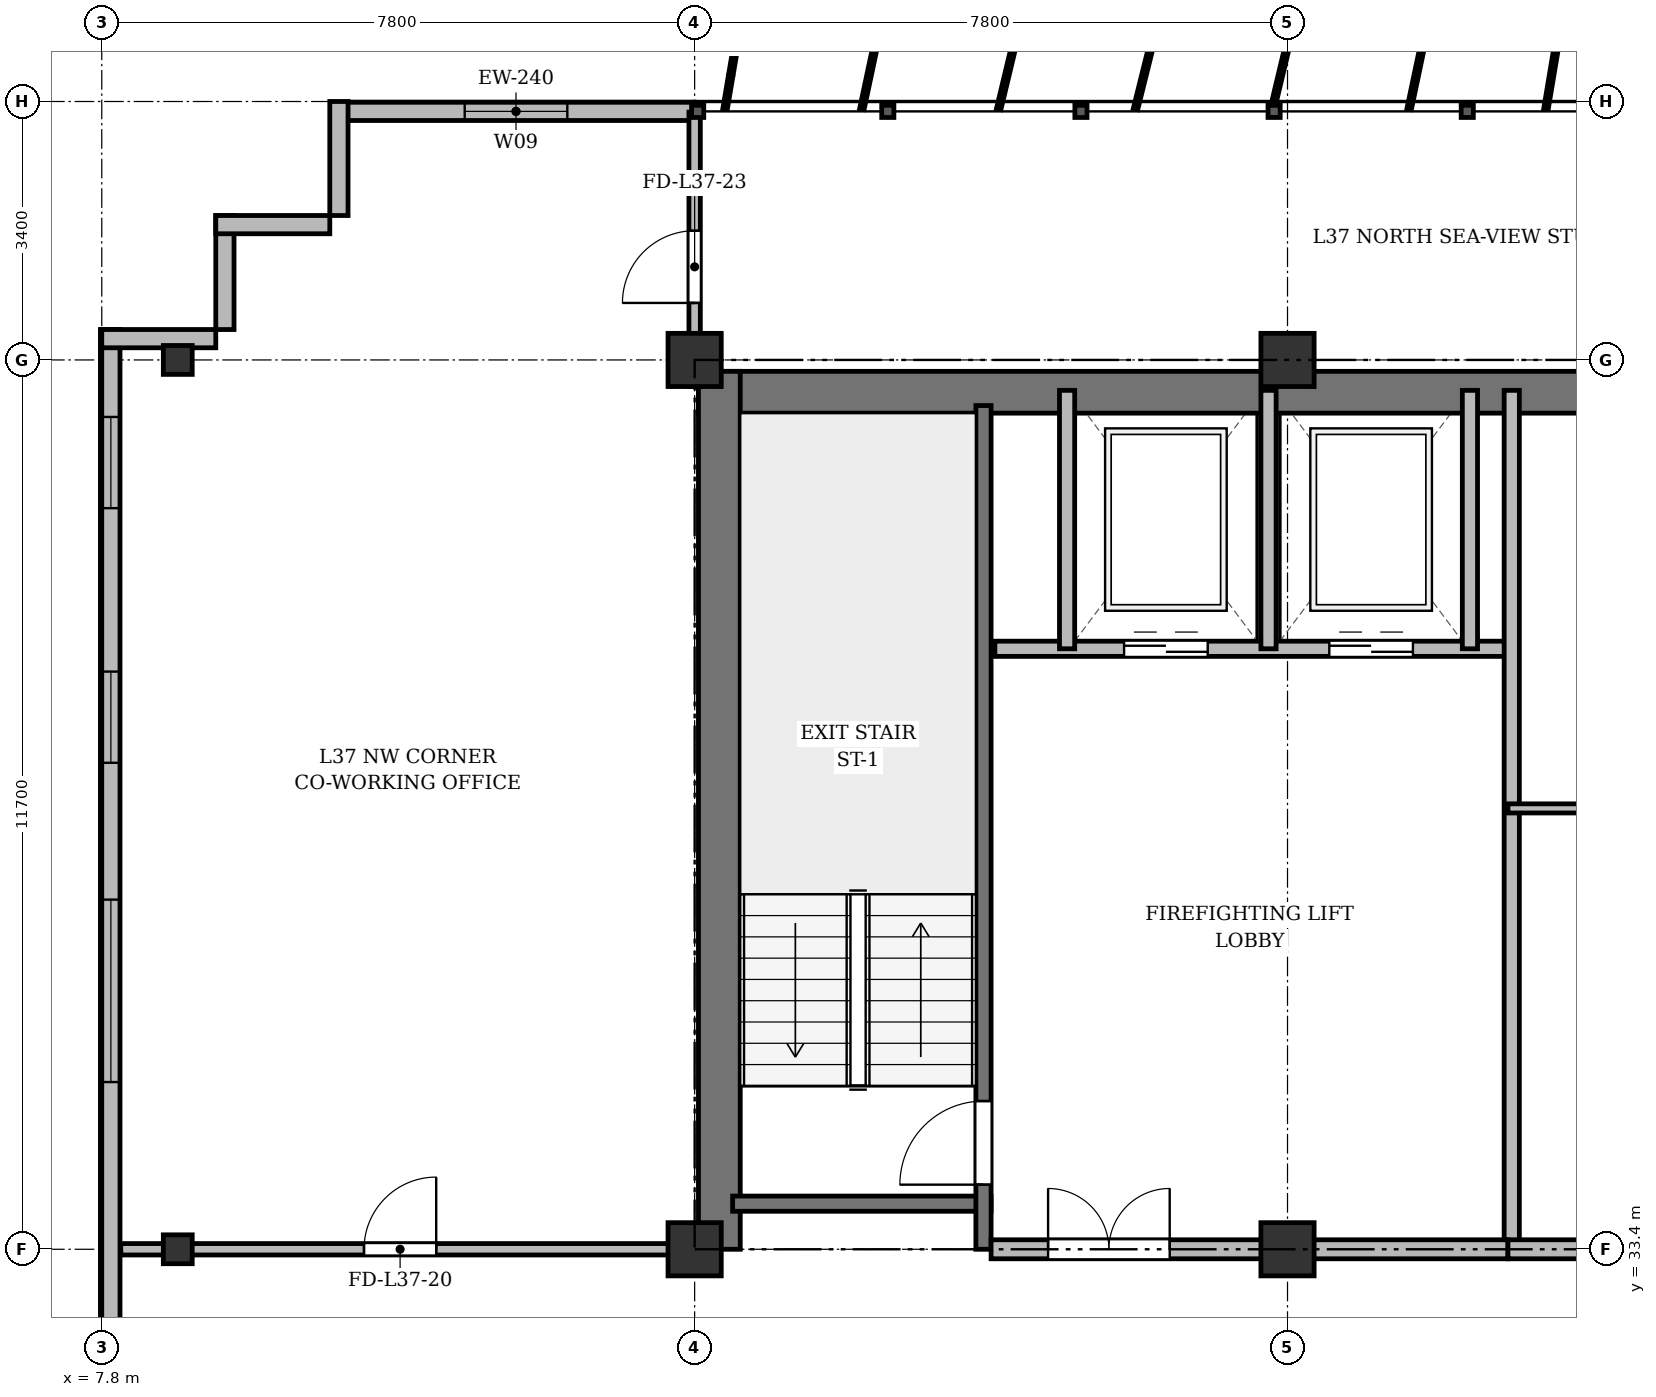
"""IFC4 building model, lengths in metres.
Left out: names, types, materials, properties, quantities, classifications, styles, units other than length and angle.
Written with IfcOpenShell. Run it as: python <this file> out.ifc"""

import sys

from ifc_helpers import new_model, si_unit, direction, frame, frame_2d, origin, origin_2d, place, context, subcontext, project, spatial, rectangle, i_section, extrude, source, transform, mapped, element, fill, save


model = new_model("IFC4")
c1 = context("Model", 3, precision=1e-05, world=origin(), true_north=direction((0.0, 1.0)))
c2 = subcontext(c1, "Body", "Model", "MODEL_VIEW")
j1 = project(units=[si_unit("LENGTHUNIT", "METRE"), si_unit("PLANEANGLEUNIT", "RADIAN")], contexts=[c1])
p1 = place(None, origin())
s1 = spatial("IfcSite", under=j1, at=p1, CompositionType="ELEMENT")
p2 = place(p1, origin())
s2 = spatial("IfcBuilding", under=s1, at=p2, CompositionType="ELEMENT")
p3 = place(p2, frame((0.0, 0.0, 142.9)))
s3 = spatial("IfcBuildingStorey", under=s2, at=p3, CompositionType="ELEMENT", Elevation=142.9)
m1 = source(origin(), c2, "Body", "SweptSolid", [
    extrude(i_section(OverallWidth=0.38, OverallDepth=0.38, WebThickness=0.02, FlangeThickness=0.03, at=origin_2d()), origin(), (0.0, 0.0, 1.0), 3.6),
])
for number, where, z_axis, x_axis in (
    (1, (8.8, 33.4, 0.0), (0.0, 0.0, 1.0), (1.0, 0.0, 0.0)),
    (2, (8.8, 45.1, 0.0), (0.0, 0.0, 1.0), (1.0, 0.0, 0.0)),
):
    element("IfcColumn", number, at=place(p3, frame(where, z_axis=z_axis, x_axis=x_axis)), inside=s3, PredefinedType="COLUMN", context=c2, shape_type="MappedRepresentation", body=[
        mapped(m1, transform((0.0, 0.0, 0.0), x_axis=(1.0, 0.0, 0.0), y_axis=(0.0, 1.0, 0.0), z_axis=(0.0, 0.0, 1.0), scale=1.0)),
    ])
m2 = source(origin(), c2, "Body", "SweptSolid", [
    extrude(rectangle(XDim=0.7, YDim=0.7, at=origin_2d()), origin(), (0.0, 0.0, 1.0), 3.6),
])
for number, where, z_axis, x_axis in (
    (3, (15.6, 33.4, 0.0), (0.0, 0.0, 1.0), (1.0, 0.0, 0.0)),
    (4, (15.6, 45.1, 0.0), (0.0, 0.0, 1.0), (1.0, 0.0, 0.0)),
    (5, (23.4, 33.4, 0.0), (0.0, 0.0, 1.0), (1.0, 0.0, 0.0)),
    (6, (23.4, 45.1, 0.0), (0.0, 0.0, 1.0), (1.0, 0.0, 0.0)),
):
    element("IfcColumn", number, at=place(p3, frame(where, z_axis=z_axis, x_axis=x_axis)), inside=s3, PredefinedType="COLUMN", context=c2, shape_type="MappedRepresentation", body=[
        mapped(m2, transform((0.0, 0.0, 0.0), x_axis=(1.0, 0.0, 0.0), y_axis=(0.0, 1.0, 0.0), z_axis=(0.0, 0.0, 1.0), scale=1.0)),
    ])
p4 = place(p3, frame((10.9, 48.37, 0.0), z_axis=(0.0, 0.0, 1.0), x_axis=(1.0, 0.0, 0.0)))
e7 = element("IfcWall", 7, at=p4, inside=s3, PredefinedType="SOLIDWALL", context=c2, shape_type="SweptSolid", body=[
    extrude(rectangle(XDim=4.7, YDim=0.24, at=frame_2d((2.35, 0.0))), origin(), (0.0, 0.0, 1.0), 3.35),
])
p5 = place(p4, frame((1.675, 0.0, 0.9)))
e8 = element("IfcOpeningElement", 8, at=p5, cuts=e7, PredefinedType="OPENING", context=c2, shape_type="SweptSolid", body=[
    extrude(rectangle(XDim=1.35, YDim=1.5, at=frame_2d((0.675, 0.75))), frame((0.0, 0.13, 0.0), z_axis=(0.0, -1.0, 0.0), x_axis=(1.0, 0.0, 0.0)), (0.0, 0.0, 1.0), 0.26),
])
p6 = place(p3, frame((7.92, 6.3, 0.0), z_axis=(0.0, 0.0, 1.0), x_axis=(0.0, 1.0, 0.0)))
e9 = element("IfcWall", 9, at=p6, inside=s3, PredefinedType="SOLIDWALL", context=c2, shape_type="SweptSolid", body=[
    extrude(rectangle(XDim=39.2, YDim=0.24, at=frame_2d((19.6, 0.0))), origin(), (0.0, 0.0, 1.0), 3.35),
])
p7 = place(p6, frame((1.45, 0.0, 0.92)))
e10 = element("IfcOpeningElement", 10, at=p7, cuts=e9, PredefinedType="OPENING", context=c2, shape_type="SweptSolid", body=[
    extrude(rectangle(XDim=1.2, YDim=1.65, at=frame_2d((0.6, 0.825))), frame((0.0, 0.13, 0.0), z_axis=(0.0, -1.0, 0.0), x_axis=(1.0, 0.0, 0.0)), (0.0, 0.0, 1.0), 0.26),
])
p8 = place(p6, frame((3.9, 0.0, 0.92)))
e11 = element("IfcOpeningElement", 11, at=p8, cuts=e9, PredefinedType="OPENING", context=c2, shape_type="SweptSolid", body=[
    extrude(rectangle(XDim=2.4, YDim=2.1, at=frame_2d((1.2, 1.05))), frame((0.0, 0.13, 0.0), z_axis=(0.0, -1.0, 0.0), x_axis=(1.0, 0.0, 0.0)), (0.0, 0.0, 1.0), 0.26),
])
p9 = place(p6, frame((8.1, 0.0, 0.92)))
e12 = element("IfcOpeningElement", 12, at=p9, cuts=e9, PredefinedType="OPENING", context=c2, shape_type="SweptSolid", body=[
    extrude(rectangle(XDim=2.4, YDim=2.1, at=frame_2d((1.2, 1.05))), frame((0.0, 0.13, 0.0), z_axis=(0.0, -1.0, 0.0), x_axis=(1.0, 0.0, 0.0)), (0.0, 0.0, 1.0), 0.26),
])
p10 = place(p6, frame((15.3, 0.0, 0.92)))
e13 = element("IfcOpeningElement", 13, at=p10, cuts=e9, PredefinedType="OPENING", context=c2, shape_type="SweptSolid", body=[
    extrude(rectangle(XDim=2.4, YDim=2.1, at=frame_2d((1.2, 1.05))), frame((0.0, 0.13, 0.0), z_axis=(0.0, -1.0, 0.0), x_axis=(1.0, 0.0, 0.0)), (0.0, 0.0, 1.0), 0.26),
])
p11 = place(p6, frame((29.3, 0.0, 0.92)))
e14 = element("IfcOpeningElement", 14, at=p11, cuts=e9, PredefinedType="OPENING", context=c2, shape_type="SweptSolid", body=[
    extrude(rectangle(XDim=2.4, YDim=2.1, at=frame_2d((1.2, 1.05))), frame((0.0, 0.13, 0.0), z_axis=(0.0, -1.0, 0.0), x_axis=(1.0, 0.0, 0.0)), (0.0, 0.0, 1.0), 0.26),
])
p12 = place(p6, frame((33.5, 0.0, 0.92)))
e15 = element("IfcOpeningElement", 15, at=p12, cuts=e9, PredefinedType="OPENING", context=c2, shape_type="SweptSolid", body=[
    extrude(rectangle(XDim=1.2, YDim=1.65, at=frame_2d((0.6, 0.825))), frame((0.0, 0.13, 0.0), z_axis=(0.0, -1.0, 0.0), x_axis=(1.0, 0.0, 0.0)), (0.0, 0.0, 1.0), 0.26),
])
p13 = place(p6, frame((36.85, 0.0, 0.92)))
e16 = element("IfcOpeningElement", 16, at=p13, cuts=e9, PredefinedType="OPENING", context=c2, shape_type="SweptSolid", body=[
    extrude(rectangle(XDim=1.2, YDim=1.65, at=frame_2d((0.6, 0.825))), frame((0.0, 0.13, 0.0), z_axis=(0.0, -1.0, 0.0), x_axis=(1.0, 0.0, 0.0)), (0.0, 0.0, 1.0), 0.26),
])
for number, where, z_axis, x_axis in (
    (17, (7.8, 45.38, 0.0), (0.0, 0.0, 1.0), (1.0, 0.0, 0.0)),
    (18, (9.42, 45.5, 0.0), (0.0, 0.0, 1.0), (0.0, 1.0, 0.0)),
    (19, (9.3, 46.88, 0.0), (0.0, 0.0, 1.0), (1.0, 0.0, 0.0)),
    (20, (10.92, 47.0, 0.0), (0.0, 0.0, 1.0), (0.0, 1.0, 0.0)),
):
    element("IfcWall", number, at=place(p3, frame(where, z_axis=z_axis, x_axis=x_axis)), inside=s3, PredefinedType="SOLIDWALL", context=c2, shape_type="SweptSolid", body=[
        extrude(rectangle(XDim=1.5, YDim=0.24, at=frame_2d((0.75, 0.0))), origin(), (0.0, 0.0, 1.0), 3.35),
    ])
p14 = place(p3, frame((15.65, 44.675, 0.0), z_axis=(0.0, 0.0, 1.0), x_axis=(1.0, 0.0, 0.0)))
e21 = element("IfcWall", 21, at=p14, inside=s3, PredefinedType="SHEAR", context=c2, shape_type="SweptSolid", body=[
    extrude(rectangle(XDim=43.1, YDim=0.55, at=frame_2d((21.55, 0.0))), origin(), (0.0, 0.0, 1.0), 3.35),
])
p15 = place(p3, frame((15.925, 33.4, 0.0), z_axis=(0.0, 0.0, 1.0), x_axis=(0.0, 1.0, 0.0)))
e22 = element("IfcWall", 22, at=p15, inside=s3, PredefinedType="SHEAR", context=c2, shape_type="SweptSolid", body=[
    extrude(rectangle(XDim=11.55, YDim=0.55, at=frame_2d((5.775, 0.0))), origin(), (0.0, 0.0, 1.0), 3.35),
])
p16 = place(p3, frame((16.1, 34.0, 0.0), z_axis=(0.0, 0.0, 1.0), x_axis=(1.0, 0.0, 0.0)))
e23 = element("IfcWall", 23, at=p16, inside=s3, PredefinedType="SHEAR", context=c2, shape_type="SweptSolid", body=[
    extrude(rectangle(XDim=3.4, YDim=0.2, at=frame_2d((1.7, 0.0))), origin(), (0.0, 0.0, 1.0), 3.35),
])
p17 = place(p3, frame((19.4, 33.4, 0.0), z_axis=(0.0, 0.0, 1.0), x_axis=(0.0, 1.0, 0.0)))
e24 = element("IfcWall", 24, at=p17, inside=s3, PredefinedType="SHEAR", context=c2, shape_type="SweptSolid", body=[
    extrude(rectangle(XDim=11.1, YDim=0.2, at=frame_2d((5.55, 0.0))), origin(), (0.0, 0.0, 1.0), 3.35),
])
p18 = place(p17, frame((0.85, 0.0, 0.0)))
e25 = element("IfcOpeningElement", 25, at=p18, cuts=e24, PredefinedType="OPENING", context=c2, shape_type="SweptSolid", body=[
    extrude(rectangle(XDim=1.1, YDim=2.15, at=frame_2d((0.55, 1.075))), frame((0.0, 0.11, 0.0), z_axis=(0.0, -1.0, 0.0), x_axis=(1.0, 0.0, 0.0)), (0.0, 0.0, 1.0), 0.22),
])
p19 = place(p3, frame((19.55, 41.3, 0.0), z_axis=(0.0, 0.0, 1.0), x_axis=(1.0, 0.0, 0.0)))
e26 = element("IfcWall", 26, at=p19, inside=s3, PredefinedType="SOLIDWALL", context=c2, shape_type="SweptSolid", body=[
    extrude(rectangle(XDim=6.75, YDim=0.2, at=frame_2d((3.375, 0.0))), origin(), (0.0, 0.0, 1.0), 3.35),
])
p20 = place(p19, frame((1.7, 0.0, 0.0)))
e27 = element("IfcOpeningElement", 27, at=p20, cuts=e26, PredefinedType="OPENING", context=c2, shape_type="SweptSolid", body=[
    extrude(rectangle(XDim=1.1, YDim=2.15, at=frame_2d((0.55, 1.075))), frame((0.0, 0.11, 0.0), z_axis=(0.0, -1.0, 0.0), x_axis=(1.0, 0.0, 0.0)), (0.0, 0.0, 1.0), 0.22),
])
p21 = place(p19, frame((4.4, 0.0, 0.0)))
e28 = element("IfcOpeningElement", 28, at=p21, cuts=e26, PredefinedType="OPENING", context=c2, shape_type="SweptSolid", body=[
    extrude(rectangle(XDim=1.1, YDim=2.15, at=frame_2d((0.55, 1.075))), frame((0.0, 0.11, 0.0), z_axis=(0.0, -1.0, 0.0), x_axis=(1.0, 0.0, 0.0)), (0.0, 0.0, 1.0), 0.22),
])
for number, where, z_axis, x_axis in (
    (29, (20.5, 41.3, 0.0), (0.0, 0.0, 1.0), (0.0, 1.0, 0.0)),
    (30, (23.15, 41.3, 0.0), (0.0, 0.0, 1.0), (0.0, 1.0, 0.0)),
    (31, (25.8, 41.3, 0.0), (0.0, 0.0, 1.0), (0.0, 1.0, 0.0)),
):
    element("IfcWall", number, at=place(p3, frame(where, z_axis=z_axis, x_axis=x_axis)), inside=s3, PredefinedType="SOLIDWALL", context=c2, shape_type="SweptSolid", body=[
        extrude(rectangle(XDim=3.4, YDim=0.2, at=frame_2d((1.7, 0.0))), origin(), (0.0, 0.0, 1.0), 3.35),
    ])
p22 = place(p3, frame((26.35, 33.4, 0.0), z_axis=(0.0, 0.0, 1.0), x_axis=(0.0, 1.0, 0.0)))
e32 = element("IfcWall", 32, at=p22, inside=s3, PredefinedType="SOLIDWALL", context=c2, shape_type="SweptSolid", body=[
    extrude(rectangle(XDim=11.3, YDim=0.2, at=frame_2d((5.65, 0.0))), origin(), (0.0, 0.0, 1.0), 2.75),
])
p23 = place(p3, frame((19.5, 33.4, 0.0), z_axis=(0.0, 0.0, 1.0), x_axis=(1.0, 0.0, 0.0)))
e33 = element("IfcWall", 33, at=p23, inside=s3, PredefinedType="PARTITIONING", context=c2, shape_type="SweptSolid", body=[
    extrude(rectangle(XDim=6.8, YDim=0.25, at=frame_2d((3.4, 0.0))), origin(), (0.0, 0.0, 1.0), 2.75),
])
p24 = place(p23, frame((0.75, 0.0, 0.0)))
e34 = element("IfcOpeningElement", 34, at=p24, cuts=e33, PredefinedType="OPENING", context=c2, shape_type="SweptSolid", body=[
    extrude(rectangle(XDim=1.6, YDim=2.2, at=frame_2d((0.8, 1.1))), frame((0.0, 0.135, 0.0), z_axis=(0.0, -1.0, 0.0), x_axis=(1.0, 0.0, 0.0)), (0.0, 0.0, 1.0), 0.27),
])
p25 = place(p3, frame((26.3, 39.2, 0.0), z_axis=(0.0, 0.0, 1.0), x_axis=(1.0, 0.0, 0.0)))
e35 = element("IfcWall", 35, at=p25, inside=s3, PredefinedType="PARTITIONING", context=c2, shape_type="SweptSolid", body=[
    extrude(rectangle(XDim=7.0, YDim=0.12, at=frame_2d((3.5, 0.0))), origin(), (0.0, 0.0, 1.0), 2.85),
])
p26 = place(p25, frame((2.6, 0.0, 0.0)))
e36 = element("IfcOpeningElement", 36, at=p26, cuts=e35, PredefinedType="OPENING", context=c2, shape_type="SweptSolid", body=[
    extrude(rectangle(XDim=0.95, YDim=2.15, at=frame_2d((0.475, 1.075))), frame((0.0, 0.07, 0.0), z_axis=(0.0, -1.0, 0.0), x_axis=(1.0, 0.0, 0.0)), (0.0, 0.0, 1.0), 0.14),
])
p27 = place(p3, frame((26.3, 33.4, 0.0), z_axis=(0.0, 0.0, 1.0), x_axis=(1.0, 0.0, 0.0)))
e37 = element("IfcWall", 37, at=p27, inside=s3, PredefinedType="PARTITIONING", context=c2, shape_type="SweptSolid", body=[
    extrude(rectangle(XDim=7.0, YDim=0.25, at=frame_2d((3.5, 0.0))), origin(), (0.0, 0.0, 1.0), 2.75),
])
p28 = place(p27, frame((1.35, 0.0, 0.0)))
e38 = element("IfcOpeningElement", 38, at=p28, cuts=e37, PredefinedType="OPENING", context=c2, shape_type="SweptSolid", body=[
    extrude(rectangle(XDim=0.95, YDim=2.15, at=frame_2d((0.475, 1.075))), frame((0.0, 0.135, 0.0), z_axis=(0.0, -1.0, 0.0), x_axis=(1.0, 0.0, 0.0)), (0.0, 0.0, 1.0), 0.27),
])
p29 = place(p3, frame((8.05, 33.4, 0.0), z_axis=(0.0, 0.0, 1.0), x_axis=(1.0, 0.0, 0.0)))
e39 = element("IfcWall", 39, at=p29, inside=s3, PredefinedType="PARTITIONING", context=c2, shape_type="SweptSolid", body=[
    extrude(rectangle(XDim=7.55, YDim=0.15, at=frame_2d((3.775, 0.0))), origin(), (0.0, 0.0, 1.0), 2.75),
])
p30 = place(p29, frame((3.2, 0.0, 0.0)))
e40 = element("IfcOpeningElement", 40, at=p30, cuts=e39, PredefinedType="OPENING", context=c2, shape_type="SweptSolid", body=[
    extrude(rectangle(XDim=0.95, YDim=2.15, at=frame_2d((0.475, 1.075))), frame((0.0, 0.085, 0.0), z_axis=(0.0, -1.0, 0.0), x_axis=(1.0, 0.0, 0.0)), (0.0, 0.0, 1.0), 0.17),
])
p31 = place(p3, frame((15.6, 44.75, 0.0), z_axis=(0.0, 0.0, 1.0), x_axis=(0.0, 1.0, 0.0)))
e41 = element("IfcWall", 41, at=p31, inside=s3, PredefinedType="PARTITIONING", context=c2, shape_type="SweptSolid", body=[
    extrude(rectangle(XDim=3.61, YDim=0.15, at=frame_2d((1.805, 0.0))), origin(), (0.0, 0.0, 1.0), 2.85),
])
p32 = place(p31, frame((1.1, 0.0, 0.0)))
e42 = element("IfcOpeningElement", 42, at=p32, cuts=e41, PredefinedType="OPENING", context=c2, shape_type="SweptSolid", body=[
    extrude(rectangle(XDim=0.95, YDim=2.15, at=frame_2d((0.475, 1.075))), frame((0.0, 0.085, 0.0), z_axis=(0.0, -1.0, 0.0), x_axis=(1.0, 0.0, 0.0)), (0.0, 0.0, 1.0), 0.17),
])
m3 = source(origin(), c2, "Body", "SweptSolid", [
    extrude(rectangle(XDim=1.35, YDim=1.5, at=frame_2d((0.675, 0.75))), frame((0.0, 0.03, 0.0), z_axis=(0.0, -1.0, 0.0), x_axis=(1.0, 0.0, 0.0)), (0.0, 0.0, 1.0), 0.06),
])
p33 = place(p5, origin())
e43 = element("IfcWindow", 43, at=p33, inside=s3, PartitioningType="SINGLE_PANEL", PredefinedType="WINDOW", context=c2, shape_type="MappedRepresentation", body=[
    mapped(m3, transform((0.0, 0.0, 0.0), x_axis=(1.0, 0.0, 0.0), y_axis=(0.0, 1.0, 0.0), z_axis=(0.0, 0.0, 1.0), scale=1.0)),
])
fill(e8, e43)
m4 = source(origin(), c2, "Body", "SweptSolid", [
    extrude(rectangle(XDim=2.4, YDim=2.1, at=frame_2d((1.2, 1.05))), frame((0.0, 0.03, 0.0), z_axis=(0.0, -1.0, 0.0), x_axis=(1.0, 0.0, 0.0)), (0.0, 0.0, 1.0), 0.06),
])
p34 = place(p11, origin())
e44 = element("IfcWindow", 44, at=p34, inside=s3, PartitioningType="SINGLE_PANEL", PredefinedType="WINDOW", context=c2, shape_type="MappedRepresentation", body=[
    mapped(m4, transform((0.0, 0.0, 0.0), x_axis=(1.0, 0.0, 0.0), y_axis=(0.0, 1.0, 0.0), z_axis=(0.0, 0.0, 1.0), scale=1.0)),
])
fill(e14, e44)
m5 = source(origin(), c2, "Body", "SweptSolid", [
    extrude(rectangle(XDim=1.2, YDim=1.65, at=frame_2d((0.6, 0.825))), frame((0.0, 0.03, 0.0), z_axis=(0.0, -1.0, 0.0), x_axis=(1.0, 0.0, 0.0)), (0.0, 0.0, 1.0), 0.06),
])
p35 = place(p12, origin())
e45 = element("IfcWindow", 45, at=p35, inside=s3, PartitioningType="SINGLE_PANEL", PredefinedType="WINDOW", context=c2, shape_type="MappedRepresentation", body=[
    mapped(m5, transform((0.0, 0.0, 0.0), x_axis=(1.0, 0.0, 0.0), y_axis=(0.0, 1.0, 0.0), z_axis=(0.0, 0.0, 1.0), scale=1.0)),
])
fill(e15, e45)
p36 = place(p13, origin())
e46 = element("IfcWindow", 46, at=p36, inside=s3, PartitioningType="SINGLE_PANEL", PredefinedType="WINDOW", context=c2, shape_type="MappedRepresentation", body=[
    mapped(m5, transform((0.0, 0.0, 0.0), x_axis=(1.0, 0.0, 0.0), y_axis=(0.0, 1.0, 0.0), z_axis=(0.0, 0.0, 1.0), scale=1.0)),
])
fill(e16, e46)
m6 = source(origin(), c2, "Body", "SweptSolid", [
    extrude(rectangle(XDim=1.1, YDim=2.15, at=frame_2d((0.55, 1.075))), frame((0.0, 0.025, 0.0), z_axis=(0.0, -1.0, 0.0), x_axis=(1.0, 0.0, 0.0)), (0.0, 0.0, 1.0), 0.05),
])
p37 = place(p18, origin())
e47 = element("IfcDoor", 47, at=p37, inside=s3, OperationType="SINGLE_SWING_LEFT", PredefinedType="DOOR", context=c2, shape_type="MappedRepresentation", body=[
    mapped(m6, transform((0.0, 0.0, 0.0), x_axis=(1.0, 0.0, 0.0), y_axis=(0.0, 1.0, 0.0), z_axis=(0.0, 0.0, 1.0), scale=1.0)),
])
fill(e25, e47)
p38 = place(p20, origin())
e48 = element("IfcDoor", 48, at=p38, inside=s3, OperationType="DOUBLE_DOOR_SLIDING", PredefinedType="DOOR", context=c2, shape_type="MappedRepresentation", body=[
    mapped(m6, transform((0.0, 0.0, 0.0), x_axis=(1.0, 0.0, 0.0), y_axis=(0.0, 1.0, 0.0), z_axis=(0.0, 0.0, 1.0), scale=1.0)),
])
fill(e27, e48)
p39 = place(p21, origin())
e49 = element("IfcDoor", 49, at=p39, inside=s3, OperationType="DOUBLE_DOOR_SLIDING", PredefinedType="DOOR", context=c2, shape_type="MappedRepresentation", body=[
    mapped(m6, transform((0.0, 0.0, 0.0), x_axis=(1.0, 0.0, 0.0), y_axis=(0.0, 1.0, 0.0), z_axis=(0.0, 0.0, 1.0), scale=1.0)),
])
fill(e28, e49)
m7 = source(origin(), c2, "Body", "SweptSolid", [
    extrude(rectangle(XDim=1.6, YDim=2.2, at=frame_2d((0.8, 1.1))), frame((0.0, 0.025, 0.0), z_axis=(0.0, -1.0, 0.0), x_axis=(1.0, 0.0, 0.0)), (0.0, 0.0, 1.0), 0.05),
])
p40 = place(p24, origin())
e50 = element("IfcDoor", 50, at=p40, inside=s3, OperationType="DOUBLE_DOOR_SINGLE_SWING", PredefinedType="DOOR", context=c2, shape_type="MappedRepresentation", body=[
    mapped(m7, transform((0.0, 0.0, 0.0), x_axis=(1.0, 0.0, 0.0), y_axis=(0.0, 1.0, 0.0), z_axis=(0.0, 0.0, 1.0), scale=1.0)),
])
fill(e34, e50)
m8 = source(origin(), c2, "Body", "SweptSolid", [
    extrude(rectangle(XDim=0.95, YDim=2.15, at=frame_2d((0.475, 1.075))), frame((0.0, 0.025, 0.0), z_axis=(0.0, -1.0, 0.0), x_axis=(1.0, 0.0, 0.0)), (0.0, 0.0, 1.0), 0.05),
])
p41 = place(p30, origin())
e51 = element("IfcDoor", 51, at=p41, inside=s3, OperationType="SINGLE_SWING_RIGHT", PredefinedType="DOOR", context=c2, shape_type="MappedRepresentation", body=[
    mapped(m8, transform((0.0, 0.0, 0.0), x_axis=(1.0, 0.0, 0.0), y_axis=(0.0, 1.0, 0.0), z_axis=(0.0, 0.0, 1.0), scale=1.0)),
])
fill(e40, e51)
p42 = place(p32, origin())
e52 = element("IfcDoor", 52, at=p42, inside=s3, OperationType="SINGLE_SWING_LEFT", PredefinedType="DOOR", context=c2, shape_type="MappedRepresentation", body=[
    mapped(m8, transform((0.0, 0.0, 0.0), x_axis=(1.0, 0.0, 0.0), y_axis=(0.0, 1.0, 0.0), z_axis=(0.0, 0.0, 1.0), scale=1.0)),
])
fill(e42, e52)
save(model, sys.argv[1])
